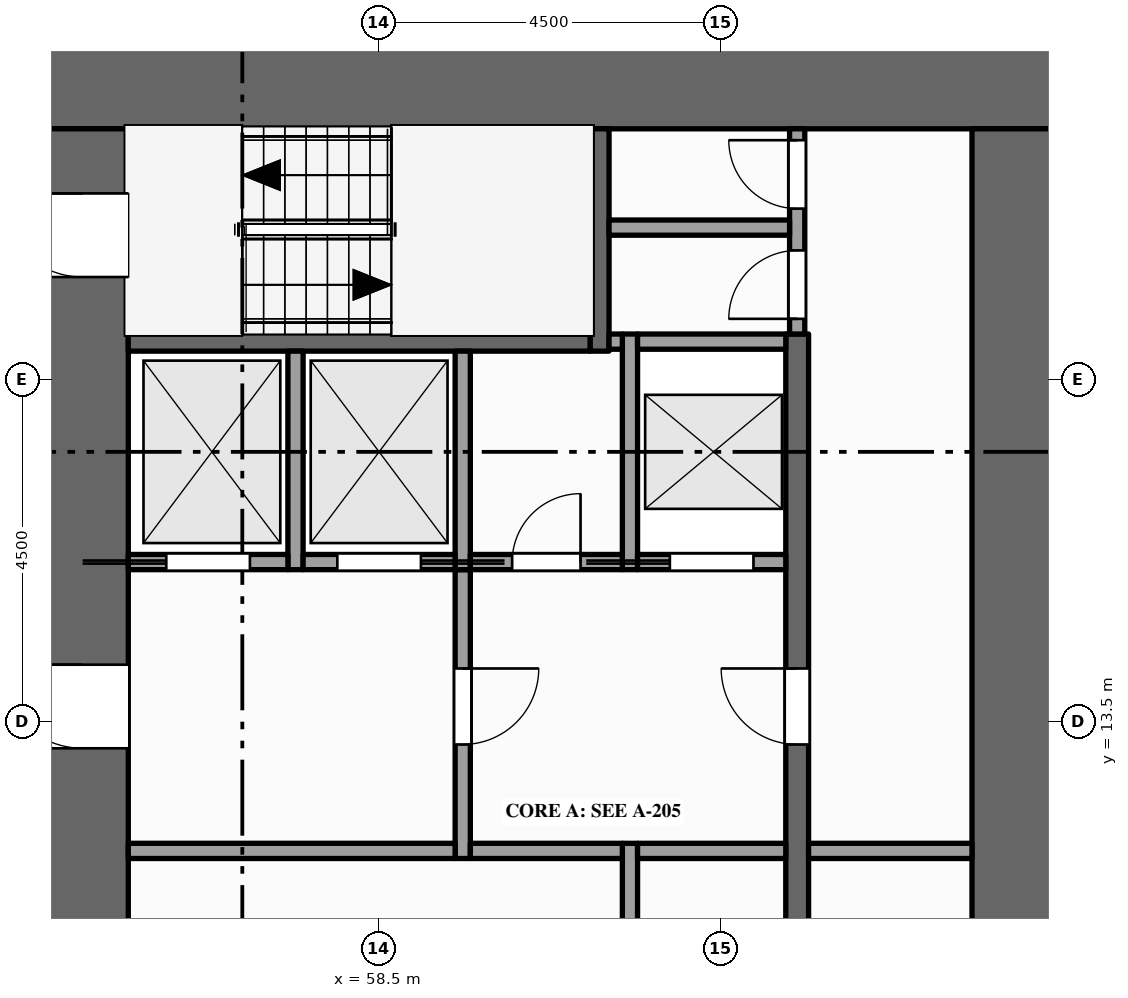
"""IFC4 building model, lengths in metres.
Left out: names, types, materials, properties, quantities, classifications, styles, units other than length and angle.
Written with IfcOpenShell. Run it as: python <this file> out.ifc"""

import sys

from ifc_helpers import new_model, si_unit, direction, frame, frame_2d, origin, place, context, subcontext, project, spatial, rectangle, extrude, element, fill, save


model = new_model("IFC4")
c1 = context("Model", 3, precision=1e-05, world=origin(), true_north=direction((0.0, 1.0)))
c2 = subcontext(c1, "Body", "Model", "MODEL_VIEW")
j1 = project(units=[si_unit("LENGTHUNIT", "METRE"), si_unit("PLANEANGLEUNIT", "RADIAN")], contexts=[c1])
p1 = place(None, origin())
s1 = spatial("IfcSite", under=j1, at=p1, CompositionType="ELEMENT")
p2 = place(p1, origin())
s2 = spatial("IfcBuilding", under=s1, at=p2, CompositionType="ELEMENT")
p3 = place(p2, frame((0.0, 0.0, 24.0)))
s3 = spatial("IfcBuildingStorey", under=s2, at=p3, CompositionType="ELEMENT", Elevation=24.0)
p4 = place(p3, frame((54.0, 21.9, -0.15), z_axis=(0.0, 0.0, 1.0), x_axis=(1.0, 0.0, 0.0)))
e1 = element("IfcWall", 1, at=p4, inside=s3, PredefinedType="SHEAR", context=c2, shape_type="SweptSolid", body=[
    extrude(rectangle(XDim=13.5, YDim=1.2, at=frame_2d((6.75, 0.0))), origin(), (0.0, 0.0, 1.0), 5.0),
])
p5 = place(p3, frame((54.6, 1.2, -0.15), z_axis=(0.0, 0.0, 1.0), x_axis=(0.0, 1.0, 0.0)))
e2 = element("IfcWall", 2, at=p5, inside=s3, PredefinedType="SHEAR", context=c2, shape_type="SweptSolid", body=[
    extrude(rectangle(XDim=20.1, YDim=1.2, at=frame_2d((10.05, 0.0))), origin(), (0.0, 0.0, 1.0), 5.0),
])
p6 = place(p5, frame((5.9, 0.0, 0.15)))
e3 = element("IfcOpeningElement", 3, at=p6, cuts=e2, PredefinedType="OPENING", context=c2, shape_type="SweptSolid", body=[
    extrude(rectangle(XDim=1.8, YDim=2.1, at=frame_2d((0.9, 1.05))), frame((0.0, 0.61, 0.0), z_axis=(0.0, -1.0, 0.0), x_axis=(1.0, 0.0, 0.0)), (0.0, 0.0, 1.0), 1.22),
])
p7 = place(p5, frame((11.95, 0.0, 0.15)))
e4 = element("IfcOpeningElement", 4, at=p7, cuts=e2, PredefinedType="OPENING", context=c2, shape_type="SweptSolid", body=[
    extrude(rectangle(XDim=1.1, YDim=2.1, at=frame_2d((0.55, 1.05))), frame((0.0, 0.61, 0.0), z_axis=(0.0, -1.0, 0.0), x_axis=(1.0, 0.0, 0.0)), (0.0, 0.0, 1.0), 1.22),
])
p8 = place(p5, frame((0.95, 0.0, 0.15)))
e5 = element("IfcOpeningElement", 5, at=p8, cuts=e2, PredefinedType="OPENING", context=c2, shape_type="SweptSolid", body=[
    extrude(rectangle(XDim=1.1, YDim=2.1, at=frame_2d((0.55, 1.05))), frame((0.0, 0.61, 0.0), z_axis=(0.0, -1.0, 0.0), x_axis=(1.0, 0.0, 0.0)), (0.0, 0.0, 1.0), 1.22),
])
p9 = place(p5, frame((18.15, 0.0, 0.15)))
e6 = element("IfcOpeningElement", 6, at=p9, cuts=e2, PredefinedType="OPENING", context=c2, shape_type="SweptSolid", body=[
    extrude(rectangle(XDim=1.1, YDim=2.1, at=frame_2d((0.55, 1.05))), frame((0.0, 0.61, 0.0), z_axis=(0.0, -1.0, 0.0), x_axis=(1.0, 0.0, 0.0)), (0.0, 0.0, 1.0), 1.22),
])
p10 = place(p3, frame((66.9, 1.2, -0.15), z_axis=(0.0, 0.0, 1.0), x_axis=(0.0, 1.0, 0.0)))
e7 = element("IfcWall", 7, at=p10, inside=s3, PredefinedType="SHEAR", context=c2, shape_type="SweptSolid", body=[
    extrude(rectangle(XDim=20.1, YDim=1.2, at=frame_2d((10.05, 0.0))), origin(), (0.0, 0.0, 1.0), 5.0),
])
p11 = place(p3, frame((57.4, 15.5, 0.0), z_axis=(0.0, 0.0, 1.0), x_axis=(0.0, 1.0, 0.0)))
e8 = element("IfcWall", 8, at=p11, inside=s3, PredefinedType="SOLIDWALL", context=c2, shape_type="SweptSolid", body=[
    extrude(rectangle(XDim=2.875, YDim=0.2, at=frame_2d((1.438, 0.0))), origin(), (0.0, 0.0, 1.0), 4.85),
])
p12 = place(p3, frame((59.6, 11.7, 0.0), z_axis=(0.0, 0.0, 1.0), x_axis=(0.0, 1.0, 0.0)))
e9 = element("IfcWall", 9, at=p12, inside=s3, PredefinedType="PARTITIONING", context=c2, shape_type="SweptSolid", body=[
    extrude(rectangle(XDim=3.8, YDim=0.2, at=frame_2d((1.9, 0.0))), origin(), (0.0, 0.0, 1.0), 4.85),
])
p13 = place(p12, frame((1.5, 0.0, 0.0)))
e10 = element("IfcOpeningElement", 10, at=p13, cuts=e9, PredefinedType="OPENING", context=c2, shape_type="SweptSolid", body=[
    extrude(rectangle(XDim=1.0, YDim=2.1, at=frame_2d((0.5, 1.05))), frame((0.0, 0.11, 0.0), z_axis=(0.0, -1.0, 0.0), x_axis=(1.0, 0.0, 0.0)), (0.0, 0.0, 1.0), 0.22),
])
p14 = place(p3, frame((59.6, 15.5, 0.0), z_axis=(0.0, 0.0, 1.0), x_axis=(0.0, 1.0, 0.0)))
e11 = element("IfcWall", 11, at=p14, inside=s3, PredefinedType="SOLIDWALL", context=c2, shape_type="SweptSolid", body=[
    extrude(rectangle(XDim=2.875, YDim=0.2, at=frame_2d((1.438, 0.0))), origin(), (0.0, 0.0, 1.0), 4.85),
])
p15 = place(p3, frame((61.4, 18.375, 0.0), z_axis=(0.0, 0.0, 1.0), x_axis=(0.0, 1.0, 0.0)))
e12 = element("IfcWall", 12, at=p15, inside=s3, PredefinedType="SHEAR", context=c2, shape_type="SweptSolid", body=[
    extrude(rectangle(XDim=2.925, YDim=0.25, at=frame_2d((1.462, 0.0))), origin(), (0.0, 0.0, 1.0), 4.85),
])
p16 = place(p3, frame((61.8, 9.3, 0.0), z_axis=(0.0, 0.0, 1.0), x_axis=(0.0, 1.0, 0.0)))
e13 = element("IfcWall", 13, at=p16, inside=s3, PredefinedType="PARTITIONING", context=c2, shape_type="SweptSolid", body=[
    extrude(rectangle(XDim=2.6, YDim=0.2, at=frame_2d((1.3, 0.0))), origin(), (0.0, 0.0, 1.0), 4.85),
])
p17 = place(p3, frame((61.8, 15.5, 0.0), z_axis=(0.0, 0.0, 1.0), x_axis=(0.0, 1.0, 0.0)))
e14 = element("IfcWall", 14, at=p17, inside=s3, PredefinedType="SOLIDWALL", context=c2, shape_type="SweptSolid", body=[
    extrude(rectangle(XDim=3.1, YDim=0.2, at=frame_2d((1.55, 0.0))), origin(), (0.0, 0.0, 1.0), 4.85),
])
p18 = place(p3, frame((64.0, 4.1, 0.0), z_axis=(0.0, 0.0, 1.0), x_axis=(0.0, 1.0, 0.0)))
e15 = element("IfcWall", 15, at=p18, inside=s3, PredefinedType="SHEAR", context=c2, shape_type="SweptSolid", body=[
    extrude(rectangle(XDim=14.5, YDim=0.3, at=frame_2d((7.25, 0.0))), origin(), (0.0, 0.0, 1.0), 4.85),
])
p19 = place(p18, frame((3.4, 0.0, 0.0)))
e16 = element("IfcOpeningElement", 16, at=p19, cuts=e15, PredefinedType="OPENING", context=c2, shape_type="SweptSolid", body=[
    extrude(rectangle(XDim=1.0, YDim=2.1, at=frame_2d((0.5, 1.05))), frame((0.0, 0.16, 0.0), z_axis=(0.0, -1.0, 0.0), x_axis=(1.0, 0.0, 0.0)), (0.0, 0.0, 1.0), 0.32),
])
p20 = place(p18, frame((9.1, 0.0, 0.0)))
e17 = element("IfcOpeningElement", 17, at=p20, cuts=e15, PredefinedType="OPENING", context=c2, shape_type="SweptSolid", body=[
    extrude(rectangle(XDim=1.0, YDim=2.1, at=frame_2d((0.5, 1.05))), frame((0.0, 0.16, 0.0), z_axis=(0.0, -1.0, 0.0), x_axis=(1.0, 0.0, 0.0)), (0.0, 0.0, 1.0), 0.32),
])
p21 = place(p3, frame((64.0, 18.6, 0.0), z_axis=(0.0, 0.0, 1.0), x_axis=(0.0, 1.0, 0.0)))
e18 = element("IfcWall", 18, at=p21, inside=s3, PredefinedType="PARTITIONING", context=c2, shape_type="SweptSolid", body=[
    extrude(rectangle(XDim=2.7, YDim=0.2, at=frame_2d((1.35, 0.0))), origin(), (0.0, 0.0, 1.0), 4.85),
])
p22 = place(p21, frame((0.2, 0.0, 0.0)))
e19 = element("IfcOpeningElement", 19, at=p22, cuts=e18, PredefinedType="OPENING", context=c2, shape_type="SweptSolid", body=[
    extrude(rectangle(XDim=0.9, YDim=2.1, at=frame_2d((0.45, 1.05))), frame((0.0, 0.11, 0.0), z_axis=(0.0, -1.0, 0.0), x_axis=(1.0, 0.0, 0.0)), (0.0, 0.0, 1.0), 0.22),
])
p23 = place(p21, frame((1.65, 0.0, 0.0)))
e20 = element("IfcOpeningElement", 20, at=p23, cuts=e18, PredefinedType="OPENING", context=c2, shape_type="SweptSolid", body=[
    extrude(rectangle(XDim=0.9, YDim=2.1, at=frame_2d((0.45, 1.05))), frame((0.0, 0.11, 0.0), z_axis=(0.0, -1.0, 0.0), x_axis=(1.0, 0.0, 0.0)), (0.0, 0.0, 1.0), 0.22),
])
p24 = place(p3, frame((55.2, 11.8, 0.0), z_axis=(0.0, 0.0, 1.0), x_axis=(1.0, 0.0, 0.0)))
e21 = element("IfcWall", 21, at=p24, inside=s3, PredefinedType="PARTITIONING", context=c2, shape_type="SweptSolid", body=[
    extrude(rectangle(XDim=4.3, YDim=0.2, at=frame_2d((2.15, 0.0))), origin(), (0.0, 0.0, 1.0), 4.85),
])
p25 = place(p3, frame((59.7, 11.8, 0.0), z_axis=(0.0, 0.0, 1.0), x_axis=(1.0, 0.0, 0.0)))
e22 = element("IfcWall", 22, at=p25, inside=s3, PredefinedType="PARTITIONING", context=c2, shape_type="SweptSolid", body=[
    extrude(rectangle(XDim=2.0, YDim=0.2, at=frame_2d((1.0, 0.0))), origin(), (0.0, 0.0, 1.0), 4.85),
])
p26 = place(p3, frame((61.9, 11.8, 0.0), z_axis=(0.0, 0.0, 1.0), x_axis=(1.0, 0.0, 0.0)))
e23 = element("IfcWall", 23, at=p26, inside=s3, PredefinedType="PARTITIONING", context=c2, shape_type="SweptSolid", body=[
    extrude(rectangle(XDim=1.95, YDim=0.2, at=frame_2d((0.975, 0.0))), origin(), (0.0, 0.0, 1.0), 4.85),
])
p27 = place(p3, frame((64.15, 11.8, 0.0), z_axis=(0.0, 0.0, 1.0), x_axis=(1.0, 0.0, 0.0)))
e24 = element("IfcWall", 24, at=p27, inside=s3, PredefinedType="PARTITIONING", context=c2, shape_type="SweptSolid", body=[
    extrude(rectangle(XDim=2.15, YDim=0.2, at=frame_2d((1.075, 0.0))), origin(), (0.0, 0.0, 1.0), 4.85),
])
p28 = place(p3, frame((55.2, 15.6, 0.0), z_axis=(0.0, 0.0, 1.0), x_axis=(1.0, 0.0, 0.0)))
e25 = element("IfcWall", 25, at=p28, inside=s3, PredefinedType="SOLIDWALL", context=c2, shape_type="SweptSolid", body=[
    extrude(rectangle(XDim=2.1, YDim=0.2, at=frame_2d((1.05, 0.0))), origin(), (0.0, 0.0, 1.0), 4.85),
])
p29 = place(p28, frame((0.5, 0.0, 0.012)))
e26 = element("IfcOpeningElement", 26, at=p29, cuts=e25, PredefinedType="OPENING", context=c2, shape_type="SweptSolid", body=[
    extrude(rectangle(XDim=1.1, YDim=2.1, at=frame_2d((0.55, 1.05))), frame((0.0, 0.11, 0.0), z_axis=(0.0, -1.0, 0.0), x_axis=(1.0, 0.0, 0.0)), (0.0, 0.0, 1.0), 0.22),
])
p30 = place(p3, frame((57.5, 15.6, 0.0), z_axis=(0.0, 0.0, 1.0), x_axis=(1.0, 0.0, 0.0)))
e27 = element("IfcWall", 27, at=p30, inside=s3, PredefinedType="SOLIDWALL", context=c2, shape_type="SweptSolid", body=[
    extrude(rectangle(XDim=2.0, YDim=0.2, at=frame_2d((1.0, 0.0))), origin(), (0.0, 0.0, 1.0), 4.85),
])
p31 = place(p30, frame((0.45, 0.0, 0.012)))
e28 = element("IfcOpeningElement", 28, at=p31, cuts=e27, PredefinedType="OPENING", context=c2, shape_type="SweptSolid", body=[
    extrude(rectangle(XDim=1.1, YDim=2.1, at=frame_2d((0.55, 1.05))), frame((0.0, 0.11, 0.0), z_axis=(0.0, -1.0, 0.0), x_axis=(1.0, 0.0, 0.0)), (0.0, 0.0, 1.0), 0.22),
])
p32 = place(p3, frame((59.7, 15.6, 0.0), z_axis=(0.0, 0.0, 1.0), x_axis=(1.0, 0.0, 0.0)))
e29 = element("IfcWall", 29, at=p32, inside=s3, PredefinedType="PARTITIONING", context=c2, shape_type="SweptSolid", body=[
    extrude(rectangle(XDim=2.0, YDim=0.2, at=frame_2d((1.0, 0.0))), origin(), (0.0, 0.0, 1.0), 4.85),
])
p33 = place(p32, frame((0.55, 0.0, 0.0)))
e30 = element("IfcOpeningElement", 30, at=p33, cuts=e29, PredefinedType="OPENING", context=c2, shape_type="SweptSolid", body=[
    extrude(rectangle(XDim=0.9, YDim=2.1, at=frame_2d((0.45, 1.05))), frame((0.0, 0.11, 0.0), z_axis=(0.0, -1.0, 0.0), x_axis=(1.0, 0.0, 0.0)), (0.0, 0.0, 1.0), 0.22),
])
p34 = place(p3, frame((61.9, 15.6, 0.0), z_axis=(0.0, 0.0, 1.0), x_axis=(1.0, 0.0, 0.0)))
e31 = element("IfcWall", 31, at=p34, inside=s3, PredefinedType="SOLIDWALL", context=c2, shape_type="SweptSolid", body=[
    extrude(rectangle(XDim=1.95, YDim=0.2, at=frame_2d((0.975, 0.0))), origin(), (0.0, 0.0, 1.0), 4.85),
])
p35 = place(p34, frame((0.425, 0.0, 0.012)))
e32 = element("IfcOpeningElement", 32, at=p35, cuts=e31, PredefinedType="OPENING", context=c2, shape_type="SweptSolid", body=[
    extrude(rectangle(XDim=1.1, YDim=2.1, at=frame_2d((0.55, 1.05))), frame((0.0, 0.11, 0.0), z_axis=(0.0, -1.0, 0.0), x_axis=(1.0, 0.0, 0.0)), (0.0, 0.0, 1.0), 0.22),
])
p36 = place(p3, frame((55.2, 18.5, 0.0), z_axis=(0.0, 0.0, 1.0), x_axis=(1.0, 0.0, 0.0)))
e33 = element("IfcWall", 33, at=p36, inside=s3, PredefinedType="SHEAR", context=c2, shape_type="SweptSolid", body=[
    extrude(rectangle(XDim=6.075, YDim=0.25, at=frame_2d((3.038, 0.0))), origin(), (0.0, 0.0, 1.0), 4.85),
])
p37 = place(p3, frame((61.525, 18.5, 0.0), z_axis=(0.0, 0.0, 1.0), x_axis=(1.0, 0.0, 0.0)))
e34 = element("IfcWall", 34, at=p37, inside=s3, PredefinedType="PARTITIONING", context=c2, shape_type="SweptSolid", body=[
    extrude(rectangle(XDim=0.175, YDim=0.2, at=frame_2d((0.087, 0.0))), origin(), (0.0, 0.0, 1.0), 4.85),
])
p38 = place(p3, frame((61.9, 18.5, 0.0), z_axis=(0.0, 0.0, 1.0), x_axis=(1.0, 0.0, 0.0)))
e35 = element("IfcWall", 35, at=p38, inside=s3, PredefinedType="SOLIDWALL", context=c2, shape_type="SweptSolid", body=[
    extrude(rectangle(XDim=1.95, YDim=0.2, at=frame_2d((0.975, 0.0))), origin(), (0.0, 0.0, 1.0), 4.85),
])
p39 = place(p3, frame((61.525, 20.0, 0.0), z_axis=(0.0, 0.0, 1.0), x_axis=(1.0, 0.0, 0.0)))
e36 = element("IfcWall", 36, at=p39, inside=s3, PredefinedType="PARTITIONING", context=c2, shape_type="SweptSolid", body=[
    extrude(rectangle(XDim=2.375, YDim=0.2, at=frame_2d((1.188, 0.0))), origin(), (0.0, 0.0, 1.0), 4.85),
])
p40 = place(p29, origin())
e37 = element("IfcDoor", 37, at=p40, inside=s3, OperationType="SLIDING_TO_LEFT", PredefinedType="DOOR", context=c2, shape_type="SweptSolid", body=[
    extrude(rectangle(XDim=1.1, YDim=2.1, at=frame_2d((0.55, 1.05))), frame((0.0, 0.025, 0.0), z_axis=(0.0, -1.0, 0.0), x_axis=(1.0, 0.0, 0.0)), (0.0, 0.0, 1.0), 0.05),
])
fill(e26, e37)
p41 = place(p31, origin())
e38 = element("IfcDoor", 38, at=p41, inside=s3, OperationType="SLIDING_TO_RIGHT", PredefinedType="DOOR", context=c2, shape_type="SweptSolid", body=[
    extrude(rectangle(XDim=1.1, YDim=2.1, at=frame_2d((0.55, 1.05))), frame((0.0, 0.025, 0.0), z_axis=(0.0, -1.0, 0.0), x_axis=(1.0, 0.0, 0.0)), (0.0, 0.0, 1.0), 0.05),
])
fill(e28, e38)
p42 = place(p35, origin())
e39 = element("IfcDoor", 39, at=p42, inside=s3, OperationType="SLIDING_TO_LEFT", PredefinedType="DOOR", context=c2, shape_type="SweptSolid", body=[
    extrude(rectangle(XDim=1.1, YDim=2.1, at=frame_2d((0.55, 1.05))), frame((0.0, 0.025, 0.0), z_axis=(0.0, -1.0, 0.0), x_axis=(1.0, 0.0, 0.0)), (0.0, 0.0, 1.0), 0.05),
])
fill(e32, e39)
p43 = place(p7, origin())
e40 = element("IfcDoor", 40, at=p43, inside=s3, OperationType="SINGLE_SWING_RIGHT", PredefinedType="DOOR", context=c2, shape_type="SweptSolid", body=[
    extrude(rectangle(XDim=1.1, YDim=2.1, at=frame_2d((0.55, 1.05))), frame((0.0, 0.025, 0.0), z_axis=(0.0, -1.0, 0.0), x_axis=(1.0, 0.0, 0.0)), (0.0, 0.0, 1.0), 0.05),
])
fill(e4, e40)
p44 = place(p13, origin())
e41 = element("IfcDoor", 41, at=p44, inside=s3, OperationType="SINGLE_SWING_RIGHT", PredefinedType="DOOR", context=c2, shape_type="SweptSolid", body=[
    extrude(rectangle(XDim=1.0, YDim=2.1, at=frame_2d((0.5, 1.05))), frame((0.0, 0.025, 0.0), z_axis=(0.0, -1.0, 0.0), x_axis=(1.0, 0.0, 0.0)), (0.0, 0.0, 1.0), 0.05),
])
fill(e10, e41)
p45 = place(p20, origin())
e42 = element("IfcDoor", 42, at=p45, inside=s3, OperationType="SINGLE_SWING_RIGHT", PredefinedType="DOOR", context=c2, shape_type="SweptSolid", body=[
    extrude(rectangle(XDim=1.0, YDim=2.1, at=frame_2d((0.5, 1.05))), frame((0.0, 0.025, 0.0), z_axis=(0.0, -1.0, 0.0), x_axis=(1.0, 0.0, 0.0)), (0.0, 0.0, 1.0), 0.05),
])
fill(e17, e42)
p46 = place(p9, origin())
e43 = element("IfcDoor", 43, at=p46, inside=s3, OperationType="SINGLE_SWING_RIGHT", PredefinedType="DOOR", context=c2, shape_type="SweptSolid", body=[
    extrude(rectangle(XDim=1.1, YDim=2.1, at=frame_2d((0.55, 1.05))), frame((0.0, 0.025, 0.0), z_axis=(0.0, -1.0, 0.0), x_axis=(1.0, 0.0, 0.0)), (0.0, 0.0, 1.0), 0.05),
])
fill(e6, e43)
p47 = place(p22, origin())
e44 = element("IfcDoor", 44, at=p47, inside=s3, OperationType="SINGLE_SWING_LEFT", PredefinedType="DOOR", context=c2, shape_type="SweptSolid", body=[
    extrude(rectangle(XDim=0.9, YDim=2.1, at=frame_2d((0.45, 1.05))), frame((0.0, 0.025, 0.0), z_axis=(0.0, -1.0, 0.0), x_axis=(1.0, 0.0, 0.0)), (0.0, 0.0, 1.0), 0.05),
])
fill(e19, e44)
p48 = place(p23, origin())
e45 = element("IfcDoor", 45, at=p48, inside=s3, OperationType="SINGLE_SWING_RIGHT", PredefinedType="DOOR", context=c2, shape_type="SweptSolid", body=[
    extrude(rectangle(XDim=0.9, YDim=2.1, at=frame_2d((0.45, 1.05))), frame((0.0, 0.025, 0.0), z_axis=(0.0, -1.0, 0.0), x_axis=(1.0, 0.0, 0.0)), (0.0, 0.0, 1.0), 0.05),
])
fill(e20, e45)
p49 = place(p33, origin())
e46 = element("IfcDoor", 46, at=p49, inside=s3, OperationType="SINGLE_SWING_RIGHT", PredefinedType="DOOR", context=c2, shape_type="SweptSolid", body=[
    extrude(rectangle(XDim=0.9, YDim=2.1, at=frame_2d((0.45, 1.05))), frame((0.0, 0.025, 0.0), z_axis=(0.0, -1.0, 0.0), x_axis=(1.0, 0.0, 0.0)), (0.0, 0.0, 1.0), 0.05),
])
fill(e30, e46)
save(model, sys.argv[1])
